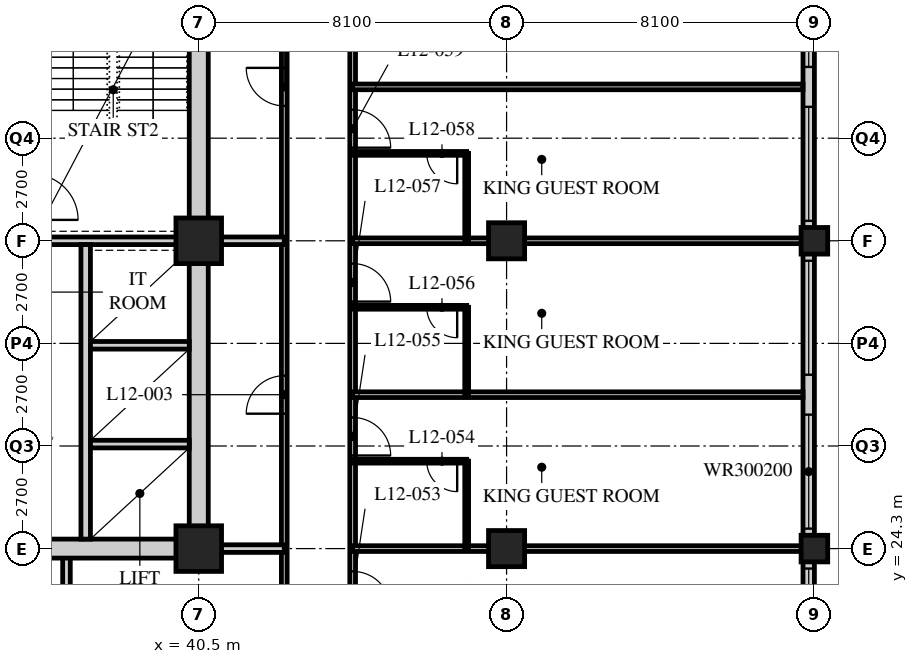
"""IFC4 building model, lengths in metres.
Left out: names, types, materials, properties, quantities, classifications, styles, units other than length and angle.
Written with IfcOpenShell. Run it as: python <this file> out.ifc"""

import sys

from ifc_helpers import new_model, si_unit, direction, frame, frame_2d, origin, origin_2d, place, context, subcontext, project, spatial, rectangle, hollow_rectangle, extrude, element, fill, save


model = new_model("IFC4")
c1 = context("Model", 3, precision=1e-05, world=origin(), true_north=direction((0.0, 1.0)))
c2 = subcontext(c1, "Body", "Model", "MODEL_VIEW")
j1 = project(units=[si_unit("LENGTHUNIT", "METRE"), si_unit("PLANEANGLEUNIT", "RADIAN")], contexts=[c1])
p1 = place(None, origin())
s1 = spatial("IfcSite", under=j1, at=p1, CompositionType="ELEMENT")
p2 = place(p1, origin())
s2 = spatial("IfcBuilding", under=s1, at=p2, CompositionType="ELEMENT")
p3 = place(p2, frame((0.0, 0.0, 53.4)))
s3 = spatial("IfcBuildingStorey", under=s2, at=p3, CompositionType="ELEMENT", Elevation=53.4)
for number, where, z_axis, x_axis in (
    (1, (40.5, 24.3, 0.0), (0.0, 0.0, 1.0), (1.0, 0.0, 0.0)),
    (2, (40.5, 32.4, 0.0), (0.0, 0.0, 1.0), (1.0, 0.0, 0.0)),
):
    element("IfcColumn", number, at=place(p3, frame(where, z_axis=z_axis, x_axis=x_axis)), inside=s3, PredefinedType="COLUMN", context=c2, shape_type="SweptSolid", body=[
        extrude(hollow_rectangle(XDim=1.2, YDim=1.2, WallThickness=0.12, at=origin_2d()), origin(), (0.0, 0.0, 1.0), 3.4),
    ])
for number, where, z_axis, x_axis in (
    (3, (48.6, 24.3, 0.0), (0.0, 0.0, 1.0), (1.0, 0.0, 0.0)),
    (4, (48.6, 32.4, 0.0), (0.0, 0.0, 1.0), (1.0, 0.0, 0.0)),
):
    element("IfcColumn", number, at=place(p3, frame(where, z_axis=z_axis, x_axis=x_axis)), inside=s3, PredefinedType="COLUMN", context=c2, shape_type="SweptSolid", body=[
        extrude(hollow_rectangle(XDim=0.95, YDim=0.95, WallThickness=0.095, at=origin_2d()), origin(), (0.0, 0.0, 1.0), 3.4),
    ])
for number, where, z_axis, x_axis in (
    (5, (56.7, 24.3, 0.0), (0.0, 0.0, 1.0), (1.0, 0.0, 0.0)),
    (6, (56.7, 32.4, 0.0), (0.0, 0.0, 1.0), (1.0, 0.0, 0.0)),
):
    element("IfcColumn", number, at=place(p3, frame(where, z_axis=z_axis, x_axis=x_axis)), inside=s3, PredefinedType="COLUMN", context=c2, shape_type="SweptSolid", body=[
        extrude(hollow_rectangle(XDim=0.7, YDim=0.7, WallThickness=0.06, at=origin_2d()), origin(), (0.0, 0.0, 1.0), 3.4),
    ])
p4 = place(p3, frame((56.55, 8.4, 0.0), z_axis=(0.0, 0.0, 1.0), x_axis=(0.0, 1.0, 0.0)))
e7 = element("IfcWall", 7, at=p4, inside=s3, PredefinedType="SOLIDWALL", context=c2, shape_type="SweptSolid", body=[
    extrude(rectangle(XDim=32.1, YDim=0.3, at=frame_2d((16.05, 0.0))), origin(), (0.0, 0.0, 1.0), 3.19),
])
p5 = place(p4, frame((0.225, 0.0, 0.9)))
e8 = element("IfcOpeningElement", 8, at=p5, cuts=e7, PredefinedType="OPENING", context=c2, shape_type="SweptSolid", body=[
    extrude(rectangle(XDim=3.0, YDim=2.0, at=frame_2d((1.5, 1.0))), frame((0.0, 0.16, 0.0), z_axis=(0.0, -1.0, 0.0), x_axis=(1.0, 0.0, 0.0)), (0.0, 0.0, 1.0), 0.32),
])
p6 = place(p4, frame((4.275, 0.0, 0.9)))
e9 = element("IfcOpeningElement", 9, at=p6, cuts=e7, PredefinedType="OPENING", context=c2, shape_type="SweptSolid", body=[
    extrude(rectangle(XDim=3.0, YDim=2.0, at=frame_2d((1.5, 1.0))), frame((0.0, 0.16, 0.0), z_axis=(0.0, -1.0, 0.0), x_axis=(1.0, 0.0, 0.0)), (0.0, 0.0, 1.0), 0.32),
])
p7 = place(p4, frame((8.325, 0.0, 0.9)))
e10 = element("IfcOpeningElement", 10, at=p7, cuts=e7, PredefinedType="OPENING", context=c2, shape_type="SweptSolid", body=[
    extrude(rectangle(XDim=3.0, YDim=2.0, at=frame_2d((1.5, 1.0))), frame((0.0, 0.16, 0.0), z_axis=(0.0, -1.0, 0.0), x_axis=(1.0, 0.0, 0.0)), (0.0, 0.0, 1.0), 0.32),
])
p8 = place(p4, frame((12.375, 0.0, 0.9)))
e11 = element("IfcOpeningElement", 11, at=p8, cuts=e7, PredefinedType="OPENING", context=c2, shape_type="SweptSolid", body=[
    extrude(rectangle(XDim=3.0, YDim=2.0, at=frame_2d((1.5, 1.0))), frame((0.0, 0.16, 0.0), z_axis=(0.0, -1.0, 0.0), x_axis=(1.0, 0.0, 0.0)), (0.0, 0.0, 1.0), 0.32),
])
p9 = place(p4, frame((16.425, 0.0, 0.9)))
e12 = element("IfcOpeningElement", 12, at=p9, cuts=e7, PredefinedType="OPENING", context=c2, shape_type="SweptSolid", body=[
    extrude(rectangle(XDim=3.0, YDim=2.0, at=frame_2d((1.5, 1.0))), frame((0.0, 0.16, 0.0), z_axis=(0.0, -1.0, 0.0), x_axis=(1.0, 0.0, 0.0)), (0.0, 0.0, 1.0), 0.32),
])
p10 = place(p4, frame((20.475, 0.0, 0.9)))
e13 = element("IfcOpeningElement", 13, at=p10, cuts=e7, PredefinedType="OPENING", context=c2, shape_type="SweptSolid", body=[
    extrude(rectangle(XDim=3.0, YDim=2.0, at=frame_2d((1.5, 1.0))), frame((0.0, 0.16, 0.0), z_axis=(0.0, -1.0, 0.0), x_axis=(1.0, 0.0, 0.0)), (0.0, 0.0, 1.0), 0.32),
])
p11 = place(p4, frame((24.525, 0.0, 0.9)))
e14 = element("IfcOpeningElement", 14, at=p11, cuts=e7, PredefinedType="OPENING", context=c2, shape_type="SweptSolid", body=[
    extrude(rectangle(XDim=3.0, YDim=2.0, at=frame_2d((1.5, 1.0))), frame((0.0, 0.16, 0.0), z_axis=(0.0, -1.0, 0.0), x_axis=(1.0, 0.0, 0.0)), (0.0, 0.0, 1.0), 0.32),
])
p12 = place(p4, frame((28.575, 0.0, 0.9)))
e15 = element("IfcOpeningElement", 15, at=p12, cuts=e7, PredefinedType="OPENING", context=c2, shape_type="SweptSolid", body=[
    extrude(rectangle(XDim=3.0, YDim=2.0, at=frame_2d((1.5, 1.0))), frame((0.0, 0.16, 0.0), z_axis=(0.0, -1.0, 0.0), x_axis=(1.0, 0.0, 0.0)), (0.0, 0.0, 1.0), 0.32),
])
p13 = place(p3, frame((44.55, 12.15, 0.0), z_axis=(0.0, 0.0, 1.0), x_axis=(0.0, 1.0, 0.0)))
e16 = element("IfcWall", 16, at=p13, inside=s3, PredefinedType="PARTITIONING", context=c2, shape_type="SweptSolid", body=[
    extrude(rectangle(XDim=30.15, YDim=0.15, at=frame_2d((15.075, 0.0))), origin(), (0.0, 0.0, 1.0), 3.19),
])
p14 = place(p13, frame((2.75, 0.0, 0.0)))
e17 = element("IfcOpeningElement", 17, at=p14, cuts=e16, PredefinedType="OPENING", context=c2, shape_type="SweptSolid", body=[
    extrude(rectangle(XDim=1.0, YDim=2.1, at=frame_2d((0.5, 1.05))), frame((0.0, 0.085, 0.0), z_axis=(0.0, -1.0, 0.0), x_axis=(1.0, 0.0, 0.0)), (0.0, 0.0, 1.0), 0.17),
])
p15 = place(p13, frame((6.5, 0.0, 0.0)))
e18 = element("IfcOpeningElement", 18, at=p15, cuts=e16, PredefinedType="OPENING", context=c2, shape_type="SweptSolid", body=[
    extrude(rectangle(XDim=1.0, YDim=2.1, at=frame_2d((0.5, 1.05))), frame((0.0, 0.085, 0.0), z_axis=(0.0, -1.0, 0.0), x_axis=(1.0, 0.0, 0.0)), (0.0, 0.0, 1.0), 0.17),
])
p16 = place(p13, frame((10.55, 0.0, 0.0)))
e19 = element("IfcOpeningElement", 19, at=p16, cuts=e16, PredefinedType="OPENING", context=c2, shape_type="SweptSolid", body=[
    extrude(rectangle(XDim=1.0, YDim=2.1, at=frame_2d((0.5, 1.05))), frame((0.0, 0.085, 0.0), z_axis=(0.0, -1.0, 0.0), x_axis=(1.0, 0.0, 0.0)), (0.0, 0.0, 1.0), 0.17),
])
p17 = place(p13, frame((14.6, 0.0, 0.0)))
e20 = element("IfcOpeningElement", 20, at=p17, cuts=e16, PredefinedType="OPENING", context=c2, shape_type="SweptSolid", body=[
    extrude(rectangle(XDim=1.0, YDim=2.1, at=frame_2d((0.5, 1.05))), frame((0.0, 0.085, 0.0), z_axis=(0.0, -1.0, 0.0), x_axis=(1.0, 0.0, 0.0)), (0.0, 0.0, 1.0), 0.17),
])
p18 = place(p13, frame((18.65, 0.0, 0.0)))
e21 = element("IfcOpeningElement", 21, at=p18, cuts=e16, PredefinedType="OPENING", context=c2, shape_type="SweptSolid", body=[
    extrude(rectangle(XDim=1.0, YDim=2.1, at=frame_2d((0.5, 1.05))), frame((0.0, 0.085, 0.0), z_axis=(0.0, -1.0, 0.0), x_axis=(1.0, 0.0, 0.0)), (0.0, 0.0, 1.0), 0.17),
])
p19 = place(p13, frame((22.7, 0.0, 0.0)))
e22 = element("IfcOpeningElement", 22, at=p19, cuts=e16, PredefinedType="OPENING", context=c2, shape_type="SweptSolid", body=[
    extrude(rectangle(XDim=1.0, YDim=2.1, at=frame_2d((0.5, 1.05))), frame((0.0, 0.085, 0.0), z_axis=(0.0, -1.0, 0.0), x_axis=(1.0, 0.0, 0.0)), (0.0, 0.0, 1.0), 0.17),
])
p20 = place(p13, frame((26.7, 0.0, 0.0)))
e23 = element("IfcOpeningElement", 23, at=p20, cuts=e16, PredefinedType="OPENING", context=c2, shape_type="SweptSolid", body=[
    extrude(rectangle(XDim=1.0, YDim=2.1, at=frame_2d((0.5, 1.05))), frame((0.0, 0.085, 0.0), z_axis=(0.0, -1.0, 0.0), x_axis=(1.0, 0.0, 0.0)), (0.0, 0.0, 1.0), 0.17),
])
p21 = place(p3, frame((42.75, 13.95, 0.0), z_axis=(0.0, 0.0, 1.0), x_axis=(0.0, 1.0, 0.0)))
e24 = element("IfcWall", 24, at=p21, inside=s3, PredefinedType="PARTITIONING", context=c2, shape_type="SweptSolid", body=[
    extrude(rectangle(XDim=26.55, YDim=0.15, at=frame_2d((13.275, 0.0))), origin(), (0.0, 0.0, 1.0), 3.19),
])
p22 = place(p21, frame((13.9, 0.0, 0.0)))
e25 = element("IfcOpeningElement", 25, at=p22, cuts=e24, PredefinedType="OPENING", context=c2, shape_type="SweptSolid", body=[
    extrude(rectangle(XDim=1.0, YDim=2.1, at=frame_2d((0.5, 1.05))), frame((0.0, 0.085, 0.0), z_axis=(0.0, -1.0, 0.0), x_axis=(1.0, 0.0, 0.0)), (0.0, 0.0, 1.0), 0.17),
])
p23 = place(p21, frame((22.0, 0.0, 0.0)))
e26 = element("IfcOpeningElement", 26, at=p23, cuts=e24, PredefinedType="OPENING", context=c2, shape_type="SweptSolid", body=[
    extrude(rectangle(XDim=1.0, YDim=2.1, at=frame_2d((0.5, 1.05))), frame((0.0, 0.085, 0.0), z_axis=(0.0, -1.0, 0.0), x_axis=(1.0, 0.0, 0.0)), (0.0, 0.0, 1.0), 0.17),
])
p24 = place(p3, frame((40.5, 32.4, 0.0), z_axis=(0.0, 0.0, 1.0), x_axis=(1.0, 0.0, 0.0)))
e27 = element("IfcWall", 27, at=p24, inside=s3, PredefinedType="SOLIDWALL", context=c2, shape_type="SweptSolid", body=[
    extrude(rectangle(XDim=2.25, YDim=0.2, at=frame_2d((1.125, 0.0))), origin(), (0.0, 0.0, 1.0), 2.578),
])
p25 = place(p3, frame((37.02, 13.95, 0.0), z_axis=(0.0, 0.0, 1.0), x_axis=(0.0, 1.0, 0.0)))
e28 = element("IfcWall", 28, at=p25, inside=s3, PredefinedType="SOLIDWALL", context=c2, shape_type="SweptSolid", body=[
    extrude(rectangle(XDim=10.35, YDim=0.2, at=frame_2d((5.175, 0.0))), origin(), (0.0, 0.0, 1.0), 3.19),
])
p26 = place(p3, frame((40.5, 24.3, 0.0), z_axis=(0.0, 0.0, 1.0), x_axis=(1.0, 0.0, 0.0)))
e29 = element("IfcWall", 29, at=p26, inside=s3, PredefinedType="SOLIDWALL", context=c2, shape_type="SweptSolid", body=[
    extrude(rectangle(XDim=2.25, YDim=0.2, at=frame_2d((1.125, 0.0))), origin(), (0.0, 0.0, 1.0), 2.578),
])
p27 = place(p3, frame((44.55, 24.3, 0.0), z_axis=(0.0, 0.0, 1.0), x_axis=(1.0, 0.0, 0.0)))
e30 = element("IfcWall", 30, at=p27, inside=s3, PredefinedType="PARTITIONING", context=c2, shape_type="SweptSolid", body=[
    extrude(rectangle(XDim=11.85, YDim=0.15, at=frame_2d((5.925, 0.0))), origin(), (0.0, 0.0, 1.0), 2.578),
])
p28 = place(p3, frame((47.55, 24.3, 0.0), z_axis=(0.0, 0.0, 1.0), x_axis=(0.0, 1.0, 0.0)))
e31 = element("IfcWall", 31, at=p28, inside=s3, PredefinedType="PARTITIONING", context=c2, shape_type="SweptSolid", body=[
    extrude(rectangle(XDim=2.3, YDim=0.1, at=frame_2d((1.15, 0.0))), origin(), (0.0, 0.0, 1.0), 3.19),
])
p29 = place(p3, frame((44.55, 26.6, 0.0), z_axis=(0.0, 0.0, 1.0), x_axis=(1.0, 0.0, 0.0)))
e32 = element("IfcWall", 32, at=p29, inside=s3, PredefinedType="PARTITIONING", context=c2, shape_type="SweptSolid", body=[
    extrude(rectangle(XDim=3.0, YDim=0.1, at=frame_2d((1.5, 0.0))), origin(), (0.0, 0.0, 1.0), 3.19),
])
p30 = place(p29, frame((1.95, 0.0, 0.0)))
e33 = element("IfcOpeningElement", 33, at=p30, cuts=e32, PredefinedType="OPENING", context=c2, shape_type="SweptSolid", body=[
    extrude(rectangle(XDim=0.8, YDim=2.1, at=frame_2d((0.4, 1.05))), frame((0.0, 0.06, 0.0), z_axis=(0.0, -1.0, 0.0), x_axis=(1.0, 0.0, 0.0)), (0.0, 0.0, 1.0), 0.12),
])
p31 = place(p3, frame((44.55, 28.35, 0.0), z_axis=(0.0, 0.0, 1.0), x_axis=(1.0, 0.0, 0.0)))
e34 = element("IfcWall", 34, at=p31, inside=s3, PredefinedType="PARTITIONING", context=c2, shape_type="SweptSolid", body=[
    extrude(rectangle(XDim=11.85, YDim=0.15, at=frame_2d((5.925, 0.0))), origin(), (0.0, 0.0, 1.0), 3.19),
])
p32 = place(p3, frame((47.55, 28.35, 0.0), z_axis=(0.0, 0.0, 1.0), x_axis=(0.0, 1.0, 0.0)))
e35 = element("IfcWall", 35, at=p32, inside=s3, PredefinedType="PARTITIONING", context=c2, shape_type="SweptSolid", body=[
    extrude(rectangle(XDim=2.3, YDim=0.1, at=frame_2d((1.15, 0.0))), origin(), (0.0, 0.0, 1.0), 3.19),
])
p33 = place(p3, frame((44.55, 30.65, 0.0), z_axis=(0.0, 0.0, 1.0), x_axis=(1.0, 0.0, 0.0)))
e36 = element("IfcWall", 36, at=p33, inside=s3, PredefinedType="PARTITIONING", context=c2, shape_type="SweptSolid", body=[
    extrude(rectangle(XDim=3.0, YDim=0.1, at=frame_2d((1.5, 0.0))), origin(), (0.0, 0.0, 1.0), 3.19),
])
p34 = place(p33, frame((1.95, 0.0, 0.0)))
e37 = element("IfcOpeningElement", 37, at=p34, cuts=e36, PredefinedType="OPENING", context=c2, shape_type="SweptSolid", body=[
    extrude(rectangle(XDim=0.8, YDim=2.1, at=frame_2d((0.4, 1.05))), frame((0.0, 0.06, 0.0), z_axis=(0.0, -1.0, 0.0), x_axis=(1.0, 0.0, 0.0)), (0.0, 0.0, 1.0), 0.12),
])
p35 = place(p3, frame((44.55, 32.4, 0.0), z_axis=(0.0, 0.0, 1.0), x_axis=(1.0, 0.0, 0.0)))
e38 = element("IfcWall", 38, at=p35, inside=s3, PredefinedType="PARTITIONING", context=c2, shape_type="SweptSolid", body=[
    extrude(rectangle(XDim=11.85, YDim=0.15, at=frame_2d((5.925, 0.0))), origin(), (0.0, 0.0, 1.0), 2.578),
])
p36 = place(p3, frame((47.55, 32.4, 0.0), z_axis=(0.0, 0.0, 1.0), x_axis=(0.0, 1.0, 0.0)))
e39 = element("IfcWall", 39, at=p36, inside=s3, PredefinedType="PARTITIONING", context=c2, shape_type="SweptSolid", body=[
    extrude(rectangle(XDim=2.3, YDim=0.1, at=frame_2d((1.15, 0.0))), origin(), (0.0, 0.0, 1.0), 3.19),
])
p37 = place(p3, frame((44.55, 34.7, 0.0), z_axis=(0.0, 0.0, 1.0), x_axis=(1.0, 0.0, 0.0)))
e40 = element("IfcWall", 40, at=p37, inside=s3, PredefinedType="PARTITIONING", context=c2, shape_type="SweptSolid", body=[
    extrude(rectangle(XDim=3.0, YDim=0.1, at=frame_2d((1.5, 0.0))), origin(), (0.0, 0.0, 1.0), 3.19),
])
p38 = place(p37, frame((1.95, 0.0, 0.0)))
e41 = element("IfcOpeningElement", 41, at=p38, cuts=e40, PredefinedType="OPENING", context=c2, shape_type="SweptSolid", body=[
    extrude(rectangle(XDim=0.8, YDim=2.1, at=frame_2d((0.4, 1.05))), frame((0.0, 0.06, 0.0), z_axis=(0.0, -1.0, 0.0), x_axis=(1.0, 0.0, 0.0)), (0.0, 0.0, 1.0), 0.12),
])
p39 = place(p3, frame((44.55, 36.45, 0.0), z_axis=(0.0, 0.0, 1.0), x_axis=(1.0, 0.0, 0.0)))
e42 = element("IfcWall", 42, at=p39, inside=s3, PredefinedType="PARTITIONING", context=c2, shape_type="SweptSolid", body=[
    extrude(rectangle(XDim=11.85, YDim=0.15, at=frame_2d((5.925, 0.0))), origin(), (0.0, 0.0, 1.0), 3.19),
])
p40 = place(p3, frame((15.95, 24.3, 0.0), z_axis=(0.0, 0.0, 1.0), x_axis=(1.0, 0.0, 0.0)))
e43 = element("IfcWall", 43, at=p40, inside=s3, PredefinedType="SOLIDWALL", context=c2, shape_type="SweptSolid", body=[
    extrude(rectangle(XDim=24.8, YDim=0.5, at=frame_2d((12.4, 0.0))), origin(), (0.0, 0.0, 1.0), 2.54),
])
p41 = place(p40, frame((11.5, 0.0, 0.0)))
e44 = element("IfcOpeningElement", 44, at=p41, cuts=e43, PredefinedType="OPENING", context=c2, shape_type="SweptSolid", body=[
    extrude(rectangle(XDim=1.8, YDim=2.4, at=frame_2d((0.9, 1.2))), frame((0.0, 0.26, 0.0), z_axis=(0.0, -1.0, 0.0), x_axis=(1.0, 0.0, 0.0)), (0.0, 0.0, 1.0), 0.52),
])
p42 = place(p3, frame((40.5, 24.55, 0.0), z_axis=(0.0, 0.0, 1.0), x_axis=(0.0, 1.0, 0.0)))
e45 = element("IfcWall", 45, at=p42, inside=s3, PredefinedType="SOLIDWALL", context=c2, shape_type="SweptSolid", body=[
    extrude(rectangle(XDim=15.7, YDim=0.5, at=frame_2d((7.85, 0.0))), origin(), (0.0, 0.0, 1.0), 2.578),
])
p43 = place(p3, frame((32.3, 32.4, 0.0), z_axis=(0.0, 0.0, 1.0), x_axis=(1.0, 0.0, 0.0)))
e46 = element("IfcWall", 46, at=p43, inside=s3, PredefinedType="SOLIDWALL", context=c2, shape_type="SweptSolid", body=[
    extrude(rectangle(XDim=7.95, YDim=0.2, at=frame_2d((3.975, 0.0))), origin(), (0.0, 0.0, 1.0), 2.578),
])
p44 = place(p3, frame((37.525, 24.55, 0.0), z_axis=(0.0, 0.0, 1.0), x_axis=(0.0, 1.0, 0.0)))
e47 = element("IfcWall", 47, at=p44, inside=s3, PredefinedType="SOLIDWALL", context=c2, shape_type="SweptSolid", body=[
    extrude(rectangle(XDim=7.75, YDim=0.25, at=frame_2d((3.875, 0.0))), origin(), (0.0, 0.0, 1.0), 3.19),
])
for number, where, z_axis, x_axis in (
    (48, (37.65, 27.05, 0.0), (0.0, 0.0, 1.0), (1.0, 0.0, 0.0)),
    (49, (37.65, 29.65, 0.0), (0.0, 0.0, 1.0), (1.0, 0.0, 0.0)),
):
    element("IfcWall", number, at=place(p3, frame(where, z_axis=z_axis, x_axis=x_axis)), inside=s3, PredefinedType="SOLIDWALL", context=c2, shape_type="SweptSolid", body=[
        extrude(rectangle(XDim=2.6, YDim=0.2, at=frame_2d((1.3, 0.0))), origin(), (0.0, 0.0, 1.0), 3.19),
    ])
p45 = place(p8, origin())
e50 = element("IfcWindow", 50, at=p45, inside=s3, PartitioningType="SINGLE_PANEL", PredefinedType="WINDOW", context=c2, shape_type="SweptSolid", body=[
    extrude(rectangle(XDim=3.0, YDim=2.0, at=frame_2d((1.5, 1.0))), frame((0.0, 0.03, 0.0), z_axis=(0.0, -1.0, 0.0), x_axis=(1.0, 0.0, 0.0)), (0.0, 0.0, 1.0), 0.06),
])
fill(e11, e50)
p46 = place(p9, origin())
e51 = element("IfcWindow", 51, at=p46, inside=s3, PartitioningType="SINGLE_PANEL", PredefinedType="WINDOW", context=c2, shape_type="SweptSolid", body=[
    extrude(rectangle(XDim=3.0, YDim=2.0, at=frame_2d((1.5, 1.0))), frame((0.0, 0.03, 0.0), z_axis=(0.0, -1.0, 0.0), x_axis=(1.0, 0.0, 0.0)), (0.0, 0.0, 1.0), 0.06),
])
fill(e12, e51)
p47 = place(p10, origin())
e52 = element("IfcWindow", 52, at=p47, inside=s3, PartitioningType="SINGLE_PANEL", PredefinedType="WINDOW", context=c2, shape_type="SweptSolid", body=[
    extrude(rectangle(XDim=3.0, YDim=2.0, at=frame_2d((1.5, 1.0))), frame((0.0, 0.03, 0.0), z_axis=(0.0, -1.0, 0.0), x_axis=(1.0, 0.0, 0.0)), (0.0, 0.0, 1.0), 0.06),
])
fill(e13, e52)
p48 = place(p11, origin())
e53 = element("IfcWindow", 53, at=p48, inside=s3, PartitioningType="SINGLE_PANEL", PredefinedType="WINDOW", context=c2, shape_type="SweptSolid", body=[
    extrude(rectangle(XDim=3.0, YDim=2.0, at=frame_2d((1.5, 1.0))), frame((0.0, 0.03, 0.0), z_axis=(0.0, -1.0, 0.0), x_axis=(1.0, 0.0, 0.0)), (0.0, 0.0, 1.0), 0.06),
])
fill(e14, e53)
p49 = place(p12, origin())
e54 = element("IfcWindow", 54, at=p49, inside=s3, PartitioningType="SINGLE_PANEL", PredefinedType="WINDOW", context=c2, shape_type="SweptSolid", body=[
    extrude(rectangle(XDim=3.0, YDim=2.0, at=frame_2d((1.5, 1.0))), frame((0.0, 0.03, 0.0), z_axis=(0.0, -1.0, 0.0), x_axis=(1.0, 0.0, 0.0)), (0.0, 0.0, 1.0), 0.06),
])
fill(e15, e54)
p50 = place(p22, origin())
e55 = element("IfcDoor", 55, at=p50, inside=s3, OperationType="SINGLE_SWING_LEFT", PredefinedType="DOOR", context=c2, shape_type="SweptSolid", body=[
    extrude(rectangle(XDim=1.0, YDim=2.1, at=frame_2d((0.5, 1.05))), frame((0.0, 0.025, 0.0), z_axis=(0.0, -1.0, 0.0), x_axis=(1.0, 0.0, 0.0)), (0.0, 0.0, 1.0), 0.05),
])
fill(e25, e55)
p51 = place(p23, origin())
e56 = element("IfcDoor", 56, at=p51, inside=s3, OperationType="SINGLE_SWING_RIGHT", PredefinedType="DOOR", context=c2, shape_type="SweptSolid", body=[
    extrude(rectangle(XDim=1.0, YDim=2.1, at=frame_2d((0.5, 1.05))), frame((0.0, 0.025, 0.0), z_axis=(0.0, -1.0, 0.0), x_axis=(1.0, 0.0, 0.0)), (0.0, 0.0, 1.0), 0.05),
])
fill(e26, e56)
p52 = place(p16, origin())
e57 = element("IfcDoor", 57, at=p52, inside=s3, OperationType="SINGLE_SWING_RIGHT", PredefinedType="DOOR", context=c2, shape_type="SweptSolid", body=[
    extrude(rectangle(XDim=1.0, YDim=2.1, at=frame_2d((0.5, 1.05))), frame((0.0, 0.025, 0.0), z_axis=(0.0, -1.0, 0.0), x_axis=(1.0, 0.0, 0.0)), (0.0, 0.0, 1.0), 0.05),
])
fill(e19, e57)
p53 = place(p30, origin())
e58 = element("IfcDoor", 58, at=p53, inside=s3, OperationType="SINGLE_SWING_LEFT", PredefinedType="DOOR", context=c2, shape_type="SweptSolid", body=[
    extrude(rectangle(XDim=0.8, YDim=2.1, at=frame_2d((0.4, 1.05))), frame((0.0, 0.025, 0.0), z_axis=(0.0, -1.0, 0.0), x_axis=(1.0, 0.0, 0.0)), (0.0, 0.0, 1.0), 0.05),
])
fill(e33, e58)
p54 = place(p17, origin())
e59 = element("IfcDoor", 59, at=p54, inside=s3, OperationType="SINGLE_SWING_RIGHT", PredefinedType="DOOR", context=c2, shape_type="SweptSolid", body=[
    extrude(rectangle(XDim=1.0, YDim=2.1, at=frame_2d((0.5, 1.05))), frame((0.0, 0.025, 0.0), z_axis=(0.0, -1.0, 0.0), x_axis=(1.0, 0.0, 0.0)), (0.0, 0.0, 1.0), 0.05),
])
fill(e20, e59)
p55 = place(p34, origin())
e60 = element("IfcDoor", 60, at=p55, inside=s3, OperationType="SINGLE_SWING_LEFT", PredefinedType="DOOR", context=c2, shape_type="SweptSolid", body=[
    extrude(rectangle(XDim=0.8, YDim=2.1, at=frame_2d((0.4, 1.05))), frame((0.0, 0.025, 0.0), z_axis=(0.0, -1.0, 0.0), x_axis=(1.0, 0.0, 0.0)), (0.0, 0.0, 1.0), 0.05),
])
fill(e37, e60)
p56 = place(p18, origin())
e61 = element("IfcDoor", 61, at=p56, inside=s3, OperationType="SINGLE_SWING_RIGHT", PredefinedType="DOOR", context=c2, shape_type="SweptSolid", body=[
    extrude(rectangle(XDim=1.0, YDim=2.1, at=frame_2d((0.5, 1.05))), frame((0.0, 0.025, 0.0), z_axis=(0.0, -1.0, 0.0), x_axis=(1.0, 0.0, 0.0)), (0.0, 0.0, 1.0), 0.05),
])
fill(e21, e61)
p57 = place(p38, origin())
e62 = element("IfcDoor", 62, at=p57, inside=s3, OperationType="SINGLE_SWING_LEFT", PredefinedType="DOOR", context=c2, shape_type="SweptSolid", body=[
    extrude(rectangle(XDim=0.8, YDim=2.1, at=frame_2d((0.4, 1.05))), frame((0.0, 0.025, 0.0), z_axis=(0.0, -1.0, 0.0), x_axis=(1.0, 0.0, 0.0)), (0.0, 0.0, 1.0), 0.05),
])
fill(e41, e62)
p58 = place(p19, origin())
e63 = element("IfcDoor", 63, at=p58, inside=s3, OperationType="SINGLE_SWING_RIGHT", PredefinedType="DOOR", context=c2, shape_type="SweptSolid", body=[
    extrude(rectangle(XDim=1.0, YDim=2.1, at=frame_2d((0.5, 1.05))), frame((0.0, 0.025, 0.0), z_axis=(0.0, -1.0, 0.0), x_axis=(1.0, 0.0, 0.0)), (0.0, 0.0, 1.0), 0.05),
])
fill(e22, e63)
save(model, sys.argv[1])
